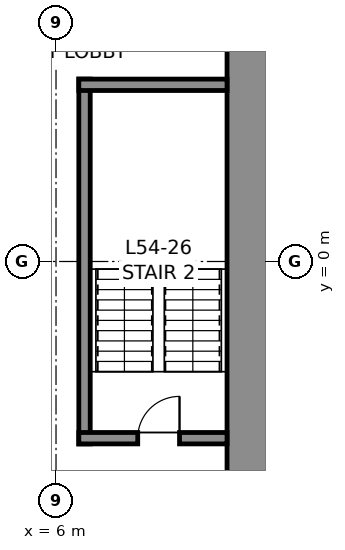
"""IFC4 building model, lengths in metres.
Left out: names, types, materials, properties, quantities, classifications, styles, units other than length and angle.
Written with IfcOpenShell. Run it as: python <this file> out.ifc"""

import sys

from ifc_helpers import new_model, si_unit, direction, frame, frame_2d, origin, place, context, subcontext, project, spatial, rectangle, extrude, element, fill, save


model = new_model("IFC4")
c1 = context("Model", 3, precision=1e-05, world=origin(), true_north=direction((0.0, 1.0)))
c2 = subcontext(c1, "Body", "Model", "MODEL_VIEW")
j1 = project(units=[si_unit("LENGTHUNIT", "METRE"), si_unit("PLANEANGLEUNIT", "RADIAN")], contexts=[c1])
p1 = place(None, origin())
s1 = spatial("IfcSite", under=j1, at=p1, CompositionType="ELEMENT")
p2 = place(p1, origin())
s2 = spatial("IfcBuilding", under=s1, at=p2, CompositionType="ELEMENT")
p3 = place(p2, frame((0.0, 0.0, 245.8)))
s3 = spatial("IfcBuildingStorey", under=s2, at=p3, CompositionType="ELEMENT", Elevation=245.8)
p4 = place(p3, frame((11.25, 10.5, 0.0), z_axis=(0.0, 0.0, 1.0), x_axis=(0.0, -1.0, 0.0)))
e1 = element("IfcWall", 1, at=p4, inside=s3, PredefinedType="SHEAR", context=c2, shape_type="SweptSolid", body=[
    extrude(rectangle(XDim=21.0, YDim=1.5, at=frame_2d((10.5, 0.0))), origin(), (0.0, 0.0, 1.0), 4.0),
])
p5 = place(p4, frame((3.7, 0.0, 0.0)))
e2 = element("IfcOpeningElement", 2, at=p5, cuts=e1, PredefinedType="OPENING", context=c2, shape_type="SweptSolid", body=[
    extrude(rectangle(XDim=1.2, YDim=2.3, at=frame_2d((0.6, 1.15))), frame((0.0, 0.76, 0.0), z_axis=(0.0, -1.0, 0.0), x_axis=(1.0, 0.0, 0.0)), (0.0, 0.0, 1.0), 1.52),
])
p6 = place(p4, frame((16.1, 0.0, 0.0)))
e3 = element("IfcOpeningElement", 3, at=p6, cuts=e1, PredefinedType="OPENING", context=c2, shape_type="SweptSolid", body=[
    extrude(rectangle(XDim=1.2, YDim=2.3, at=frame_2d((0.6, 1.15))), frame((0.0, 0.76, 0.0), z_axis=(0.0, -1.0, 0.0), x_axis=(1.0, 0.0, 0.0)), (0.0, 0.0, 1.0), 1.52),
])
p7 = place(p3, frame((6.75, -4.8, 0.0), z_axis=(0.0, 0.0, 1.0), x_axis=(0.0, 1.0, 0.0)))
e4 = element("IfcWall", 4, at=p7, inside=s3, PredefinedType="SOLIDWALL", context=c2, shape_type="SweptSolid", body=[
    extrude(rectangle(XDim=9.6, YDim=0.3, at=frame_2d((4.8, 0.0))), origin(), (0.0, 0.0, 1.0), 3.75),
])
p8 = place(p3, frame((6.6, 4.65, 0.0), z_axis=(0.0, 0.0, 1.0), x_axis=(1.0, 0.0, 0.0)))
e5 = element("IfcWall", 5, at=p8, inside=s3, PredefinedType="SOLIDWALL", context=c2, shape_type="SweptSolid", body=[
    extrude(rectangle(XDim=3.9, YDim=0.3, at=frame_2d((1.95, 0.0))), origin(), (0.0, 0.0, 1.0), 3.75),
])
p9 = place(p3, frame((10.5, -4.65, 0.0), z_axis=(0.0, 0.0, 1.0), x_axis=(-1.0, 0.0, 0.0)))
e6 = element("IfcWall", 6, at=p9, inside=s3, PredefinedType="SOLIDWALL", context=c2, shape_type="SweptSolid", body=[
    extrude(rectangle(XDim=3.9, YDim=0.3, at=frame_2d((1.95, 0.0))), origin(), (0.0, 0.0, 1.0), 3.75),
])
p10 = place(p9, frame((1.25, 0.0, 0.0)))
e7 = element("IfcOpeningElement", 7, at=p10, cuts=e6, PredefinedType="OPENING", context=c2, shape_type="SweptSolid", body=[
    extrude(rectangle(XDim=1.1, YDim=2.3, at=frame_2d((0.55, 1.15))), frame((0.0, 0.16, 0.0), z_axis=(0.0, -1.0, 0.0), x_axis=(1.0, 0.0, 0.0)), (0.0, 0.0, 1.0), 0.32),
])
p11 = place(p10, frame((1.1, 0.0, 0.0), z_axis=(0.0, 0.0, 1.0), x_axis=(-1.0, 0.0, 0.0)))
e8 = element("IfcDoor", 8, at=p11, inside=s3, OperationType="SINGLE_SWING_RIGHT", PredefinedType="DOOR", context=c2, shape_type="SweptSolid", body=[
    extrude(rectangle(XDim=1.1, YDim=2.3, at=frame_2d((0.55, 1.15))), frame((0.0, 0.025, 0.0), z_axis=(0.0, -1.0, 0.0), x_axis=(1.0, 0.0, 0.0)), (0.0, 0.0, 1.0), 0.05),
])
fill(e7, e8)
save(model, sys.argv[1])
